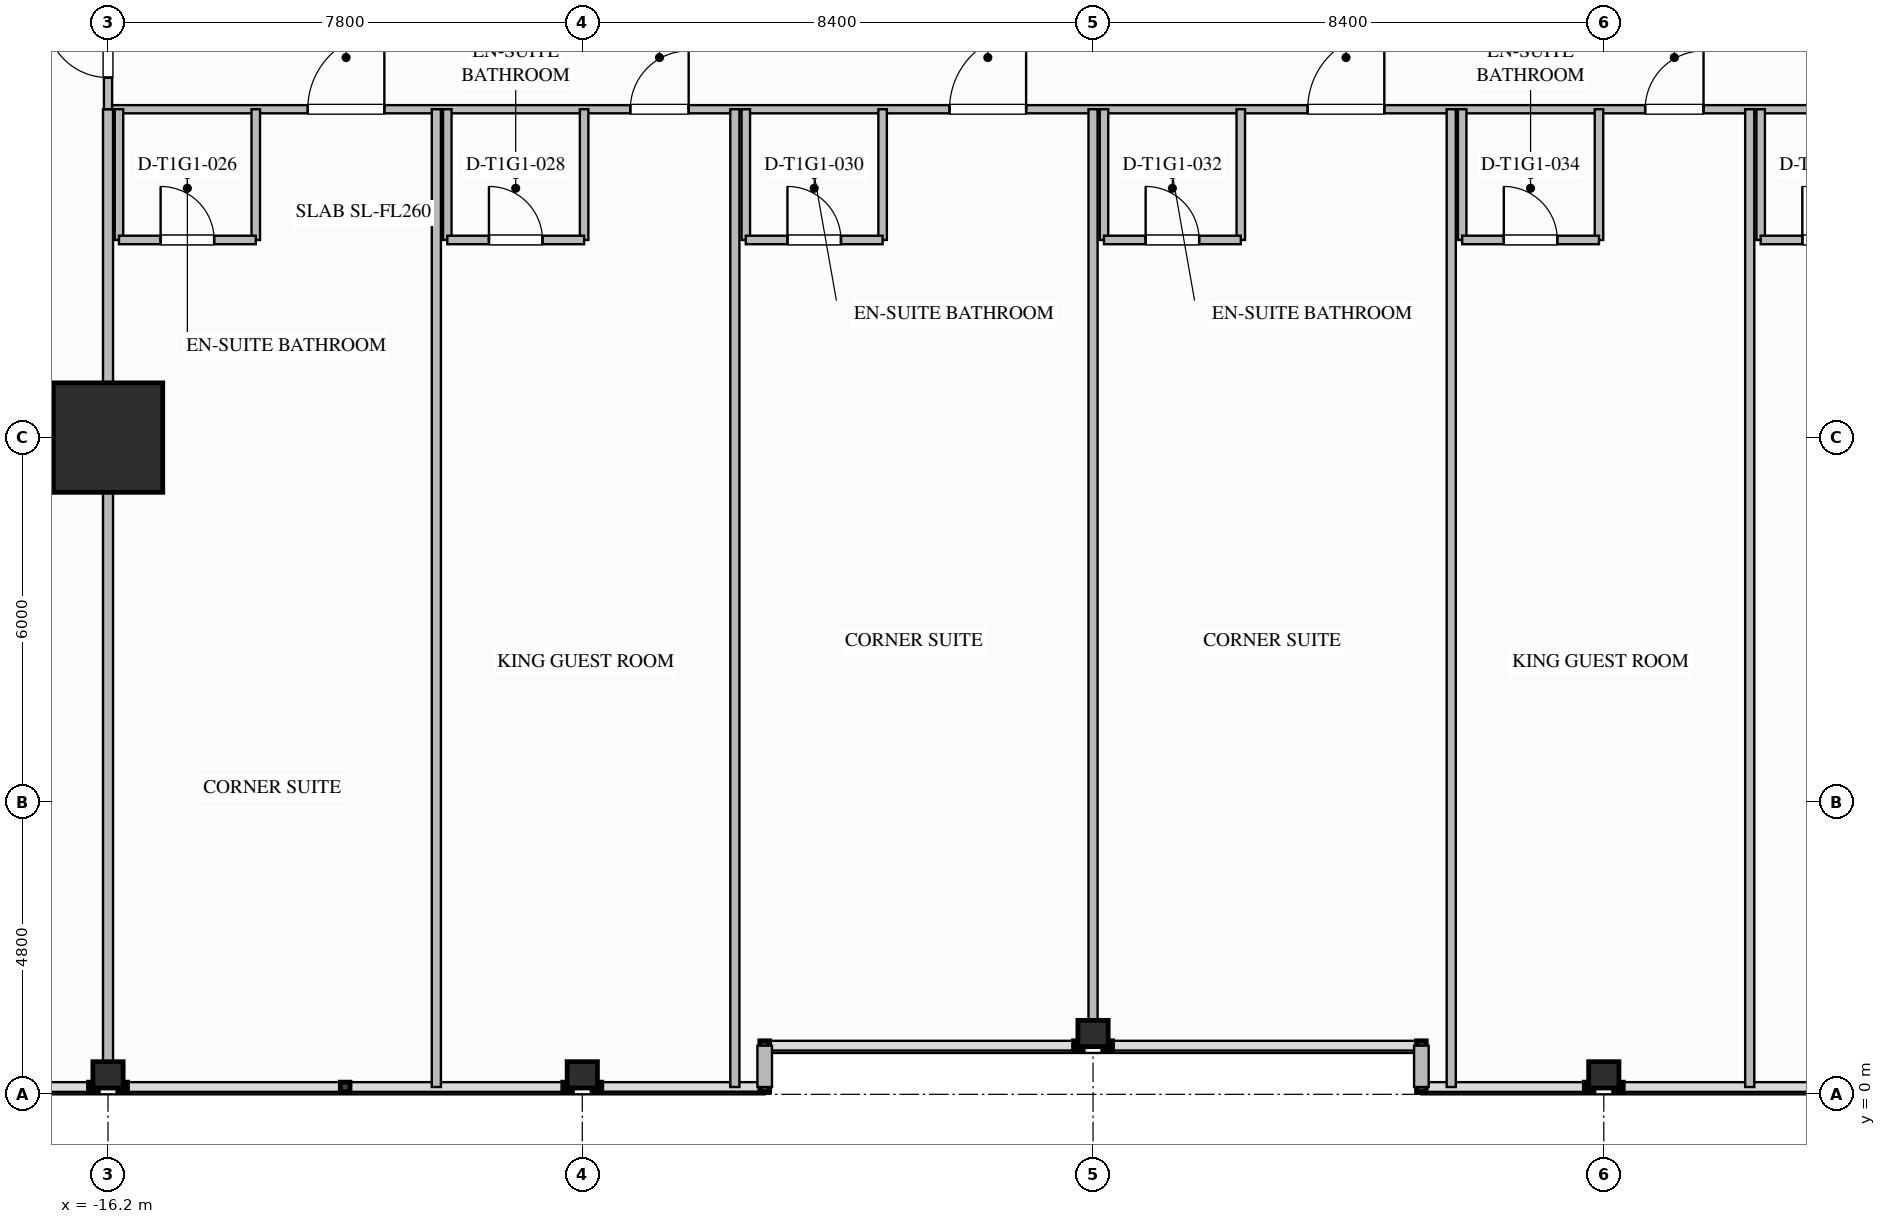
"""IFC4 building model, lengths in metres.
Left out: names, types, materials, properties, quantities, classifications, styles, units other than length and angle.
Written with IfcOpenShell. Run it as: python <this file> out.ifc"""

import sys

from ifc_helpers import new_model, si_unit, direction, frame, frame_2d, origin, origin_2d, place, context, subcontext, project, spatial, rectangle, i_section, extrude, element, fill, save


model = new_model("IFC4")
c1 = context("Model", 3, precision=1e-05, world=origin(), true_north=direction((0.0, 1.0)))
c2 = subcontext(c1, "Body", "Model", "MODEL_VIEW")
j1 = project(units=[si_unit("LENGTHUNIT", "METRE"), si_unit("PLANEANGLEUNIT", "RADIAN")], contexts=[c1])
p1 = place(None, origin())
s1 = spatial("IfcSite", under=j1, at=p1, CompositionType="ELEMENT")
p2 = place(p1, origin())
s2 = spatial("IfcBuilding", under=s1, at=p2, CompositionType="ELEMENT")
p3 = place(p2, frame((0.0, 0.0, 33.2)))
s3 = spatial("IfcBuildingStorey", under=s2, at=p3, CompositionType="ELEMENT", Elevation=33.2)
p4 = place(p3, frame((-16.2, 10.8, 0.0), z_axis=(0.0, 0.0, 1.0), x_axis=(1.0, 0.0, 0.0)))
e1 = element("IfcColumn", 1, at=p4, inside=s3, PredefinedType="COLUMN", context=c2, shape_type="SweptSolid", body=[
    extrude(rectangle(XDim=1.8, YDim=1.8, at=origin_2d()), origin(), (0.0, 0.0, 1.0), 3.5),
])
for number, where, z_axis, x_axis in (
    (2, (-16.2, 0.32, -0.26), (0.0, 0.0, 1.0), (0.0, 1.0, 0.0)),
    (3, (-8.4, 0.32, -0.26), (0.0, 0.0, 1.0), (0.0, 1.0, 0.0)),
    (4, (0.0, 1.0, -0.26), (0.0, 0.0, 1.0), (0.0, 1.0, 0.0)),
    (5, (8.4, 0.32, -0.26), (0.0, 0.0, 1.0), (0.0, 1.0, 0.0)),
):
    element("IfcColumn", number, at=place(p3, frame(where, z_axis=z_axis, x_axis=x_axis)), inside=s3, PredefinedType="COLUMN", context=c2, shape_type="SweptSolid", body=[
        extrude(i_section(OverallWidth=0.432, OverallDepth=0.498, WebThickness=0.056, FlangeThickness=0.089, FilletRadius=0.03, at=origin_2d()), origin(), (0.0, 0.0, 1.0), 3.757),
    ])
for number, where, z_axis, x_axis in (
    (6, (5.4, 0.12, 0.0), (0.0, 0.0, 1.0), (0.0, 1.0, 0.0)),
    (7, (-5.4, 0.8, 0.0), (0.0, 0.0, 1.0), (0.0, -1.0, 0.0)),
):
    element("IfcWall", number, at=place(p3, frame(where, z_axis=z_axis, x_axis=x_axis)), inside=s3, PredefinedType="STANDARD", context=c2, shape_type="SweptSolid", body=[
        extrude(rectangle(XDim=0.68, YDim=0.24, at=frame_2d((0.34, 0.0))), origin(), (0.0, 0.0, 1.0), 3.24),
    ])
p5 = place(p3, frame((-16.2, 16.2, 0.0), z_axis=(0.0, 0.0, 1.0), x_axis=(1.0, 0.0, 0.0)))
e8 = element("IfcWall", 8, at=p5, inside=s3, PredefinedType="PARTITIONING", context=c2, shape_type="SweptSolid", body=[
    extrude(rectangle(XDim=32.4, YDim=0.135, at=frame_2d((16.2, 0.0))), origin(), (0.0, 0.0, 1.0), 3.24),
])
p6 = place(p5, frame((3.285, 0.0, 0.0)))
e9 = element("IfcOpeningElement", 9, at=p6, cuts=e8, PredefinedType="OPENING", context=c2, shape_type="SweptSolid", body=[
    extrude(rectangle(XDim=1.26, YDim=2.2, at=frame_2d((0.63, 1.1))), frame((0.0, 0.077, 0.0), z_axis=(0.0, -1.0, 0.0), x_axis=(1.0, 0.0, 0.0)), (0.0, 0.0, 1.0), 0.155),
])
p7 = place(p5, frame((8.59, 0.0, 0.0)))
e10 = element("IfcOpeningElement", 10, at=p7, cuts=e8, PredefinedType="OPENING", context=c2, shape_type="SweptSolid", body=[
    extrude(rectangle(XDim=0.96, YDim=2.15, at=frame_2d((0.48, 1.075))), frame((0.0, 0.077, 0.0), z_axis=(0.0, -1.0, 0.0), x_axis=(1.0, 0.0, 0.0)), (0.0, 0.0, 1.0), 0.155),
])
p8 = place(p5, frame((13.84, 0.0, 0.0)))
e11 = element("IfcOpeningElement", 11, at=p8, cuts=e8, PredefinedType="OPENING", context=c2, shape_type="SweptSolid", body=[
    extrude(rectangle(XDim=1.26, YDim=2.2, at=frame_2d((0.63, 1.1))), frame((0.0, 0.077, 0.0), z_axis=(0.0, -1.0, 0.0), x_axis=(1.0, 0.0, 0.0)), (0.0, 0.0, 1.0), 0.155),
])
p9 = place(p5, frame((19.73, 0.0, 0.0)))
e12 = element("IfcOpeningElement", 12, at=p9, cuts=e8, PredefinedType="OPENING", context=c2, shape_type="SweptSolid", body=[
    extrude(rectangle(XDim=1.26, YDim=2.2, at=frame_2d((0.63, 1.1))), frame((0.0, 0.077, 0.0), z_axis=(0.0, -1.0, 0.0), x_axis=(1.0, 0.0, 0.0)), (0.0, 0.0, 1.0), 0.155),
])
p10 = place(p5, frame((25.281, 0.0, 0.0)))
e13 = element("IfcOpeningElement", 13, at=p10, cuts=e8, PredefinedType="OPENING", context=c2, shape_type="SweptSolid", body=[
    extrude(rectangle(XDim=0.96, YDim=2.15, at=frame_2d((0.48, 1.075))), frame((0.0, 0.077, 0.0), z_axis=(0.0, -1.0, 0.0), x_axis=(1.0, 0.0, 0.0)), (0.0, 0.0, 1.0), 0.155),
])
p11 = place(p5, frame((30.285, 0.0, 0.0)))
e14 = element("IfcOpeningElement", 14, at=p11, cuts=e8, PredefinedType="OPENING", context=c2, shape_type="SweptSolid", body=[
    extrude(rectangle(XDim=1.26, YDim=2.2, at=frame_2d((0.63, 1.1))), frame((0.0, 0.077, 0.0), z_axis=(0.0, -1.0, 0.0), x_axis=(1.0, 0.0, 0.0)), (0.0, 0.0, 1.0), 0.155),
])
p12 = place(p3, frame((-16.2, 0.12, 0.0), z_axis=(0.0, 0.0, 1.0), x_axis=(0.0, 1.0, 0.0)))
e15 = element("IfcWall", 15, at=p12, inside=s3, PredefinedType="PARTITIONING", context=c2, shape_type="SweptSolid", body=[
    extrude(rectangle(XDim=16.08, YDim=0.165, at=frame_2d((8.04, 0.0))), origin(), (0.0, 0.0, 1.0), 2.298),
])
p13 = place(p3, frame((-16.2, 16.2, 0.0), z_axis=(0.0, 0.0, 1.0), x_axis=(0.0, 1.0, 0.0)))
e16 = element("IfcWall", 16, at=p13, inside=s3, PredefinedType="PARTITIONING", context=c2, shape_type="SweptSolid", body=[
    extrude(rectangle(XDim=2.1, YDim=0.135, at=frame_2d((1.05, 0.0))), origin(), (0.0, 0.0, 1.0), 2.298),
])
p14 = place(p13, frame((0.52, 0.0, 0.0)))
e17 = element("IfcOpeningElement", 17, at=p14, cuts=e16, PredefinedType="OPENING", context=c2, shape_type="SweptSolid", body=[
    extrude(rectangle(XDim=1.02, YDim=2.15, at=frame_2d((0.51, 1.075))), frame((0.0, 0.077, 0.0), z_axis=(0.0, -1.0, 0.0), x_axis=(1.0, 0.0, 0.0)), (0.0, 0.0, 1.0), 0.155),
])
p15 = place(p3, frame((-16.02, 16.2, 0.0), z_axis=(0.0, 0.0, 1.0), x_axis=(0.0, -1.0, 0.0)))
e18 = element("IfcWall", 18, at=p15, inside=s3, PredefinedType="PLUMBINGWALL", context=c2, shape_type="SweptSolid", body=[
    extrude(rectangle(XDim=2.15, YDim=0.14, at=frame_2d((1.075, 0.0))), origin(), (0.0, 0.0, 1.0), 2.298),
])
p16 = place(p3, frame((-13.77, 16.2, 0.0), z_axis=(0.0, 0.0, 1.0), x_axis=(0.0, -1.0, 0.0)))
e19 = element("IfcWall", 19, at=p16, inside=s3, PredefinedType="PLUMBINGWALL", context=c2, shape_type="SweptSolid", body=[
    extrude(rectangle(XDim=2.15, YDim=0.14, at=frame_2d((1.075, 0.0))), origin(), (0.0, 0.0, 1.0), 3.24),
])
p17 = place(p3, frame((-16.02, 14.05, 0.0), z_axis=(0.0, 0.0, 1.0), x_axis=(1.0, 0.0, 0.0)))
e20 = element("IfcWall", 20, at=p17, inside=s3, PredefinedType="PLUMBINGWALL", context=c2, shape_type="SweptSolid", body=[
    extrude(rectangle(XDim=2.25, YDim=0.14, at=frame_2d((1.125, 0.0))), origin(), (0.0, 0.0, 1.0), 3.24),
])
p18 = place(p17, frame((0.685, 0.0, 0.0)))
e21 = element("IfcOpeningElement", 21, at=p18, cuts=e20, PredefinedType="OPENING", context=c2, shape_type="SweptSolid", body=[
    extrude(rectangle(XDim=0.88, YDim=2.1, at=frame_2d((0.44, 1.05))), frame((0.0, 0.08, 0.0), z_axis=(0.0, -1.0, 0.0), x_axis=(1.0, 0.0, 0.0)), (0.0, 0.0, 1.0), 0.16),
])
p19 = place(p3, frame((-10.8, 0.12, 0.0), z_axis=(0.0, 0.0, 1.0), x_axis=(0.0, 1.0, 0.0)))
e22 = element("IfcWall", 22, at=p19, inside=s3, PredefinedType="PARTITIONING", context=c2, shape_type="SweptSolid", body=[
    extrude(rectangle(XDim=16.08, YDim=0.15, at=frame_2d((8.04, 0.0))), origin(), (0.0, 0.0, 1.0), 3.24),
])
p20 = place(p3, frame((-10.62, 16.2, 0.0), z_axis=(0.0, 0.0, 1.0), x_axis=(0.0, -1.0, 0.0)))
e23 = element("IfcWall", 23, at=p20, inside=s3, PredefinedType="PLUMBINGWALL", context=c2, shape_type="SweptSolid", body=[
    extrude(rectangle(XDim=2.15, YDim=0.14, at=frame_2d((1.075, 0.0))), origin(), (0.0, 0.0, 1.0), 3.24),
])
p21 = place(p3, frame((-8.37, 16.2, 0.0), z_axis=(0.0, 0.0, 1.0), x_axis=(0.0, -1.0, 0.0)))
e24 = element("IfcWall", 24, at=p21, inside=s3, PredefinedType="PLUMBINGWALL", context=c2, shape_type="SweptSolid", body=[
    extrude(rectangle(XDim=2.15, YDim=0.14, at=frame_2d((1.075, 0.0))), origin(), (0.0, 0.0, 1.0), 2.617),
])
p22 = place(p3, frame((-10.62, 14.05, 0.0), z_axis=(0.0, 0.0, 1.0), x_axis=(1.0, 0.0, 0.0)))
e25 = element("IfcWall", 25, at=p22, inside=s3, PredefinedType="PLUMBINGWALL", context=c2, shape_type="SweptSolid", body=[
    extrude(rectangle(XDim=2.25, YDim=0.14, at=frame_2d((1.125, 0.0))), origin(), (0.0, 0.0, 1.0), 3.24),
])
p23 = place(p22, frame((0.685, 0.0, 0.0)))
e26 = element("IfcOpeningElement", 26, at=p23, cuts=e25, PredefinedType="OPENING", context=c2, shape_type="SweptSolid", body=[
    extrude(rectangle(XDim=0.88, YDim=2.1, at=frame_2d((0.44, 1.05))), frame((0.0, 0.08, 0.0), z_axis=(0.0, -1.0, 0.0), x_axis=(1.0, 0.0, 0.0)), (0.0, 0.0, 1.0), 0.16),
])
p24 = place(p3, frame((-5.891, 0.12, 0.0), z_axis=(0.0, 0.0, 1.0), x_axis=(0.0, 1.0, 0.0)))
e27 = element("IfcWall", 27, at=p24, inside=s3, PredefinedType="PARTITIONING", context=c2, shape_type="SweptSolid", body=[
    extrude(rectangle(XDim=16.08, YDim=0.15, at=frame_2d((8.04, 0.0))), origin(), (0.0, 0.0, 1.0), 3.24),
])
for number, where, z_axis, x_axis in (
    (28, (-5.711, 16.2, 0.0), (0.0, 0.0, 1.0), (0.0, -1.0, 0.0)),
    (29, (-3.461, 16.2, 0.0), (0.0, 0.0, 1.0), (0.0, -1.0, 0.0)),
):
    element("IfcWall", number, at=place(p3, frame(where, z_axis=z_axis, x_axis=x_axis)), inside=s3, PredefinedType="PLUMBINGWALL", context=c2, shape_type="SweptSolid", body=[
        extrude(rectangle(XDim=2.15, YDim=0.14, at=frame_2d((1.075, 0.0))), origin(), (0.0, 0.0, 1.0), 3.24),
    ])
p25 = place(p3, frame((-5.711, 14.05, 0.0), z_axis=(0.0, 0.0, 1.0), x_axis=(1.0, 0.0, 0.0)))
e30 = element("IfcWall", 30, at=p25, inside=s3, PredefinedType="PLUMBINGWALL", context=c2, shape_type="SweptSolid", body=[
    extrude(rectangle(XDim=2.25, YDim=0.14, at=frame_2d((1.125, 0.0))), origin(), (0.0, 0.0, 1.0), 3.24),
])
p26 = place(p25, frame((0.685, 0.0, 0.0)))
e31 = element("IfcOpeningElement", 31, at=p26, cuts=e30, PredefinedType="OPENING", context=c2, shape_type="SweptSolid", body=[
    extrude(rectangle(XDim=0.88, YDim=2.1, at=frame_2d((0.44, 1.05))), frame((0.0, 0.08, 0.0), z_axis=(0.0, -1.0, 0.0), x_axis=(1.0, 0.0, 0.0)), (0.0, 0.0, 1.0), 0.16),
])
p27 = place(p3, frame((0.0, 0.8, 0.0), z_axis=(0.0, 0.0, 1.0), x_axis=(0.0, 1.0, 0.0)))
e32 = element("IfcWall", 32, at=p27, inside=s3, PredefinedType="PARTITIONING", context=c2, shape_type="SweptSolid", body=[
    extrude(rectangle(XDim=15.4, YDim=0.15, at=frame_2d((7.7, 0.0))), origin(), (0.0, 0.0, 1.0), 2.298),
])
p28 = place(p3, frame((0.18, 16.2, 0.0), z_axis=(0.0, 0.0, 1.0), x_axis=(0.0, -1.0, 0.0)))
e33 = element("IfcWall", 33, at=p28, inside=s3, PredefinedType="PLUMBINGWALL", context=c2, shape_type="SweptSolid", body=[
    extrude(rectangle(XDim=2.15, YDim=0.14, at=frame_2d((1.075, 0.0))), origin(), (0.0, 0.0, 1.0), 2.617),
])
p29 = place(p3, frame((2.43, 16.2, 0.0), z_axis=(0.0, 0.0, 1.0), x_axis=(0.0, -1.0, 0.0)))
e34 = element("IfcWall", 34, at=p29, inside=s3, PredefinedType="PLUMBINGWALL", context=c2, shape_type="SweptSolid", body=[
    extrude(rectangle(XDim=2.15, YDim=0.14, at=frame_2d((1.075, 0.0))), origin(), (0.0, 0.0, 1.0), 3.24),
])
p30 = place(p3, frame((0.18, 14.05, 0.0), z_axis=(0.0, 0.0, 1.0), x_axis=(1.0, 0.0, 0.0)))
e35 = element("IfcWall", 35, at=p30, inside=s3, PredefinedType="PLUMBINGWALL", context=c2, shape_type="SweptSolid", body=[
    extrude(rectangle(XDim=2.25, YDim=0.14, at=frame_2d((1.125, 0.0))), origin(), (0.0, 0.0, 1.0), 3.24),
])
p31 = place(p30, frame((0.685, 0.0, 0.0)))
e36 = element("IfcOpeningElement", 36, at=p31, cuts=e35, PredefinedType="OPENING", context=c2, shape_type="SweptSolid", body=[
    extrude(rectangle(XDim=0.88, YDim=2.1, at=frame_2d((0.44, 1.05))), frame((0.0, 0.08, 0.0), z_axis=(0.0, -1.0, 0.0), x_axis=(1.0, 0.0, 0.0)), (0.0, 0.0, 1.0), 0.16),
])
p32 = place(p3, frame((5.891, 0.12, 0.0), z_axis=(0.0, 0.0, 1.0), x_axis=(0.0, 1.0, 0.0)))
e37 = element("IfcWall", 37, at=p32, inside=s3, PredefinedType="PARTITIONING", context=c2, shape_type="SweptSolid", body=[
    extrude(rectangle(XDim=16.08, YDim=0.15, at=frame_2d((8.04, 0.0))), origin(), (0.0, 0.0, 1.0), 3.24),
])
p33 = place(p3, frame((6.071, 16.2, 0.0), z_axis=(0.0, 0.0, 1.0), x_axis=(0.0, -1.0, 0.0)))
e38 = element("IfcWall", 38, at=p33, inside=s3, PredefinedType="PLUMBINGWALL", context=c2, shape_type="SweptSolid", body=[
    extrude(rectangle(XDim=2.15, YDim=0.14, at=frame_2d((1.075, 0.0))), origin(), (0.0, 0.0, 1.0), 3.24),
])
p34 = place(p3, frame((8.321, 16.2, 0.0), z_axis=(0.0, 0.0, 1.0), x_axis=(0.0, -1.0, 0.0)))
e39 = element("IfcWall", 39, at=p34, inside=s3, PredefinedType="PLUMBINGWALL", context=c2, shape_type="SweptSolid", body=[
    extrude(rectangle(XDim=2.15, YDim=0.14, at=frame_2d((1.075, 0.0))), origin(), (0.0, 0.0, 1.0), 2.617),
])
p35 = place(p3, frame((6.071, 14.05, 0.0), z_axis=(0.0, 0.0, 1.0), x_axis=(1.0, 0.0, 0.0)))
e40 = element("IfcWall", 40, at=p35, inside=s3, PredefinedType="PLUMBINGWALL", context=c2, shape_type="SweptSolid", body=[
    extrude(rectangle(XDim=2.25, YDim=0.14, at=frame_2d((1.125, 0.0))), origin(), (0.0, 0.0, 1.0), 3.24),
])
p36 = place(p35, frame((0.685, 0.0, 0.0)))
e41 = element("IfcOpeningElement", 41, at=p36, cuts=e40, PredefinedType="OPENING", context=c2, shape_type="SweptSolid", body=[
    extrude(rectangle(XDim=0.88, YDim=2.1, at=frame_2d((0.44, 1.05))), frame((0.0, 0.08, 0.0), z_axis=(0.0, -1.0, 0.0), x_axis=(1.0, 0.0, 0.0)), (0.0, 0.0, 1.0), 0.16),
])
p37 = place(p3, frame((10.8, 0.12, 0.0), z_axis=(0.0, 0.0, 1.0), x_axis=(0.0, 1.0, 0.0)))
e42 = element("IfcWall", 42, at=p37, inside=s3, PredefinedType="PARTITIONING", context=c2, shape_type="SweptSolid", body=[
    extrude(rectangle(XDim=16.08, YDim=0.15, at=frame_2d((8.04, 0.0))), origin(), (0.0, 0.0, 1.0), 3.24),
])
p38 = place(p3, frame((10.98, 16.2, 0.0), z_axis=(0.0, 0.0, 1.0), x_axis=(0.0, -1.0, 0.0)))
e43 = element("IfcWall", 43, at=p38, inside=s3, PredefinedType="PLUMBINGWALL", context=c2, shape_type="SweptSolid", body=[
    extrude(rectangle(XDim=2.15, YDim=0.14, at=frame_2d((1.075, 0.0))), origin(), (0.0, 0.0, 1.0), 3.24),
])
p39 = place(p3, frame((10.98, 14.05, 0.0), z_axis=(0.0, 0.0, 1.0), x_axis=(1.0, 0.0, 0.0)))
e44 = element("IfcWall", 44, at=p39, inside=s3, PredefinedType="PLUMBINGWALL", context=c2, shape_type="SweptSolid", body=[
    extrude(rectangle(XDim=2.25, YDim=0.14, at=frame_2d((1.125, 0.0))), origin(), (0.0, 0.0, 1.0), 3.24),
])
p40 = place(p39, frame((0.685, 0.0, 0.0)))
e45 = element("IfcOpeningElement", 45, at=p40, cuts=e44, PredefinedType="OPENING", context=c2, shape_type="SweptSolid", body=[
    extrude(rectangle(XDim=0.88, YDim=2.1, at=frame_2d((0.44, 1.05))), frame((0.0, 0.08, 0.0), z_axis=(0.0, -1.0, 0.0), x_axis=(1.0, 0.0, 0.0)), (0.0, 0.0, 1.0), 0.16),
])
p41 = place(p14, origin())
e46 = element("IfcDoor", 46, at=p41, inside=s3, OperationType="SINGLE_SWING_RIGHT", PredefinedType="DOOR", context=c2, shape_type="SweptSolid", body=[
    extrude(rectangle(XDim=1.02, YDim=2.15, at=frame_2d((0.51, 1.075))), frame((0.0, 0.025, 0.0), z_axis=(0.0, -1.0, 0.0), x_axis=(1.0, 0.0, 0.0)), (0.0, 0.0, 1.0), 0.05),
])
fill(e17, e46)
p42 = place(p18, origin())
e47 = element("IfcDoor", 47, at=p42, inside=s3, OperationType="SINGLE_SWING_LEFT", PredefinedType="DOOR", context=c2, shape_type="SweptSolid", body=[
    extrude(rectangle(XDim=0.88, YDim=2.1, at=frame_2d((0.44, 1.05))), frame((0.0, 0.025, 0.0), z_axis=(0.0, -1.0, 0.0), x_axis=(1.0, 0.0, 0.0)), (0.0, 0.0, 1.0), 0.05),
])
fill(e21, e47)
p43 = place(p6, origin())
e48 = element("IfcDoor", 48, at=p43, inside=s3, OperationType="SINGLE_SWING_RIGHT", PredefinedType="DOOR", context=c2, shape_type="SweptSolid", body=[
    extrude(rectangle(XDim=1.26, YDim=2.2, at=frame_2d((0.63, 1.1))), frame((0.0, 0.025, 0.0), z_axis=(0.0, -1.0, 0.0), x_axis=(1.0, 0.0, 0.0)), (0.0, 0.0, 1.0), 0.05),
])
fill(e9, e48)
p44 = place(p23, origin())
e49 = element("IfcDoor", 49, at=p44, inside=s3, OperationType="SINGLE_SWING_LEFT", PredefinedType="DOOR", context=c2, shape_type="SweptSolid", body=[
    extrude(rectangle(XDim=0.88, YDim=2.1, at=frame_2d((0.44, 1.05))), frame((0.0, 0.025, 0.0), z_axis=(0.0, -1.0, 0.0), x_axis=(1.0, 0.0, 0.0)), (0.0, 0.0, 1.0), 0.05),
])
fill(e26, e49)
p45 = place(p7, origin())
e50 = element("IfcDoor", 50, at=p45, inside=s3, OperationType="SINGLE_SWING_RIGHT", PredefinedType="DOOR", context=c2, shape_type="SweptSolid", body=[
    extrude(rectangle(XDim=0.96, YDim=2.15, at=frame_2d((0.48, 1.075))), frame((0.0, 0.025, 0.0), z_axis=(0.0, -1.0, 0.0), x_axis=(1.0, 0.0, 0.0)), (0.0, 0.0, 1.0), 0.05),
])
fill(e10, e50)
p46 = place(p26, origin())
e51 = element("IfcDoor", 51, at=p46, inside=s3, OperationType="SINGLE_SWING_LEFT", PredefinedType="DOOR", context=c2, shape_type="SweptSolid", body=[
    extrude(rectangle(XDim=0.88, YDim=2.1, at=frame_2d((0.44, 1.05))), frame((0.0, 0.025, 0.0), z_axis=(0.0, -1.0, 0.0), x_axis=(1.0, 0.0, 0.0)), (0.0, 0.0, 1.0), 0.05),
])
fill(e31, e51)
p47 = place(p8, origin())
e52 = element("IfcDoor", 52, at=p47, inside=s3, OperationType="SINGLE_SWING_RIGHT", PredefinedType="DOOR", context=c2, shape_type="SweptSolid", body=[
    extrude(rectangle(XDim=1.26, YDim=2.2, at=frame_2d((0.63, 1.1))), frame((0.0, 0.025, 0.0), z_axis=(0.0, -1.0, 0.0), x_axis=(1.0, 0.0, 0.0)), (0.0, 0.0, 1.0), 0.05),
])
fill(e11, e52)
p48 = place(p31, origin())
e53 = element("IfcDoor", 53, at=p48, inside=s3, OperationType="SINGLE_SWING_LEFT", PredefinedType="DOOR", context=c2, shape_type="SweptSolid", body=[
    extrude(rectangle(XDim=0.88, YDim=2.1, at=frame_2d((0.44, 1.05))), frame((0.0, 0.025, 0.0), z_axis=(0.0, -1.0, 0.0), x_axis=(1.0, 0.0, 0.0)), (0.0, 0.0, 1.0), 0.05),
])
fill(e36, e53)
p49 = place(p9, origin())
e54 = element("IfcDoor", 54, at=p49, inside=s3, OperationType="SINGLE_SWING_RIGHT", PredefinedType="DOOR", context=c2, shape_type="SweptSolid", body=[
    extrude(rectangle(XDim=1.26, YDim=2.2, at=frame_2d((0.63, 1.1))), frame((0.0, 0.025, 0.0), z_axis=(0.0, -1.0, 0.0), x_axis=(1.0, 0.0, 0.0)), (0.0, 0.0, 1.0), 0.05),
])
fill(e12, e54)
p50 = place(p36, origin())
e55 = element("IfcDoor", 55, at=p50, inside=s3, OperationType="SINGLE_SWING_LEFT", PredefinedType="DOOR", context=c2, shape_type="SweptSolid", body=[
    extrude(rectangle(XDim=0.88, YDim=2.1, at=frame_2d((0.44, 1.05))), frame((0.0, 0.025, 0.0), z_axis=(0.0, -1.0, 0.0), x_axis=(1.0, 0.0, 0.0)), (0.0, 0.0, 1.0), 0.05),
])
fill(e41, e55)
p51 = place(p10, origin())
e56 = element("IfcDoor", 56, at=p51, inside=s3, OperationType="SINGLE_SWING_RIGHT", PredefinedType="DOOR", context=c2, shape_type="SweptSolid", body=[
    extrude(rectangle(XDim=0.96, YDim=2.15, at=frame_2d((0.48, 1.075))), frame((0.0, 0.025, 0.0), z_axis=(0.0, -1.0, 0.0), x_axis=(1.0, 0.0, 0.0)), (0.0, 0.0, 1.0), 0.05),
])
fill(e13, e56)
p52 = place(p40, origin())
e57 = element("IfcDoor", 57, at=p52, inside=s3, OperationType="SINGLE_SWING_LEFT", PredefinedType="DOOR", context=c2, shape_type="SweptSolid", body=[
    extrude(rectangle(XDim=0.88, YDim=2.1, at=frame_2d((0.44, 1.05))), frame((0.0, 0.025, 0.0), z_axis=(0.0, -1.0, 0.0), x_axis=(1.0, 0.0, 0.0)), (0.0, 0.0, 1.0), 0.05),
])
fill(e45, e57)
save(model, sys.argv[1])
